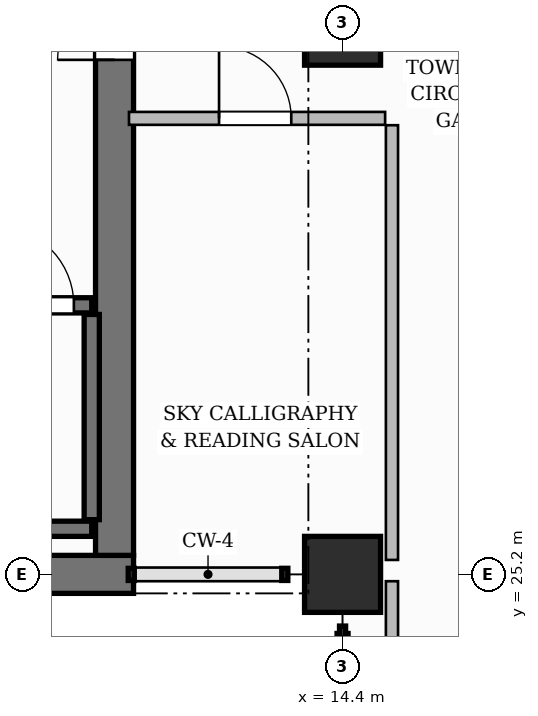
"""IFC4 building model, lengths in metres.
Left out: names, types, materials, properties, quantities, classifications, styles, units other than length and angle.
Written with IfcOpenShell. Run it as: python <this file> out.ifc"""

import sys

from ifc_helpers import new_model, si_unit, direction, frame, frame_2d, origin, origin_2d, place, context, subcontext, project, spatial, rectangle, extrude, source, transform, mapped, element, fill, save


model = new_model("IFC4")
c1 = context("Model", 3, precision=1e-05, world=origin(), true_north=direction((0.0, 1.0)))
c2 = subcontext(c1, "Body", "Model", "MODEL_VIEW")
j1 = project(units=[si_unit("LENGTHUNIT", "METRE"), si_unit("PLANEANGLEUNIT", "RADIAN")], contexts=[c1])
p1 = place(None, origin())
s1 = spatial("IfcSite", under=j1, at=p1, CompositionType="ELEMENT")
p2 = place(p1, origin())
s2 = spatial("IfcBuilding", under=s1, at=p2, CompositionType="ELEMENT")
p3 = place(p2, frame((0.0, 0.0, 192.65)))
s3 = spatial("IfcBuildingStorey", under=s2, at=p3, CompositionType="ELEMENT", Elevation=192.65)
p4 = place(p3, frame((3.35, 25.2, 0.0), z_axis=(0.0, 0.0, 1.0), x_axis=(1.0, 0.0, 0.0)))
e1 = element("IfcWall", 1, at=p4, inside=s3, PredefinedType="SHEAR", context=c2, shape_type="SweptSolid", body=[
    extrude(rectangle(XDim=8.3, YDim=0.5, at=frame_2d((4.15, 0.0))), origin(), (0.0, 0.0, 1.0), 3.85),
])
p5 = place(p3, frame((11.4, 25.45, 0.0), z_axis=(0.0, 0.0, 1.0), x_axis=(0.0, 1.0, 0.0)))
e2 = element("IfcWall", 2, at=p5, inside=s3, PredefinedType="SHEAR", context=c2, shape_type="SweptSolid", body=[
    extrude(rectangle(XDim=13.9, YDim=0.5, at=frame_2d((6.95, 0.0))), origin(), (0.0, 0.0, 1.0), 3.85),
])
p6 = place(p5, frame((6.52, 0.0, 0.0)))
e3 = element("IfcOpeningElement", 3, at=p6, cuts=e2, PredefinedType="OPENING", context=c2, shape_type="SweptSolid", body=[
    extrude(rectangle(XDim=1.5, YDim=2.2, at=frame_2d((0.75, 1.1))), frame((0.0, 0.26, 0.0), z_axis=(0.0, -1.0, 0.0), x_axis=(1.0, 0.0, 0.0)), (0.0, 0.0, 1.0), 0.52),
])
m1 = source(origin(), c2, "Body", "SweptSolid", [
    extrude(rectangle(XDim=1.0, YDim=1.0, at=origin_2d()), origin(), (0.0, 0.0, 1.0), 3.85),
])
for number, where, z_axis, x_axis in (
    (4, (14.4, 25.2, 0.0), (0.0, 0.0, 1.0), (1.0, 0.0, 0.0)),
    (5, (14.4, 32.4, 0.0), (0.0, 0.0, 1.0), (1.0, 0.0, 0.0)),
):
    element("IfcColumn", number, at=place(p3, frame(where, z_axis=z_axis, x_axis=x_axis)), inside=s3, PredefinedType="COLUMN", context=c2, shape_type="MappedRepresentation", body=[
        mapped(m1, transform((0.0, 0.0, 0.0), scale=1.0)),
    ])
p7 = place(p3, frame((4.0, 25.8, 0.0), z_axis=(0.0, 0.0, 1.0), x_axis=(1.0, 0.0, 0.0)))
e6 = element("IfcWall", 6, at=p7, inside=s3, PredefinedType="SHEAR", context=c2, shape_type="SweptSolid", body=[
    extrude(rectangle(XDim=7.1, YDim=0.2, at=frame_2d((3.55, 0.0))), origin(), (0.0, 0.0, 1.0), 3.85),
])
p8 = place(p3, frame((11.1, 25.92, 0.0), z_axis=(0.0, 0.0, 1.0), x_axis=(0.0, 1.0, 0.0)))
e7 = element("IfcWall", 7, at=p8, inside=s3, PredefinedType="SHEAR", context=c2, shape_type="SweptSolid", body=[
    extrude(rectangle(XDim=2.7, YDim=0.2, at=frame_2d((1.35, 0.0))), origin(), (0.0, 0.0, 1.0), 3.85),
])
p9 = place(p3, frame((4.0, 28.74, 0.0), z_axis=(0.0, 0.0, 1.0), x_axis=(1.0, 0.0, 0.0)))
e8 = element("IfcWall", 8, at=p9, inside=s3, PredefinedType="SHEAR", context=c2, shape_type="SweptSolid", body=[
    extrude(rectangle(XDim=7.1, YDim=0.2, at=frame_2d((3.55, 0.0))), origin(), (0.0, 0.0, 1.0), 3.85),
])
p10 = place(p9, frame((5.815, 0.0, 0.0)))
e9 = element("IfcOpeningElement", 9, at=p10, cuts=e8, PredefinedType="OPENING", context=c2, shape_type="SweptSolid", body=[
    extrude(rectangle(XDim=1.05, YDim=2.2, at=frame_2d((0.525, 1.1))), frame((0.0, 0.11, 0.0), z_axis=(0.0, -1.0, 0.0), x_axis=(1.0, 0.0, 0.0)), (0.0, 0.0, 1.0), 0.22),
])
p11 = place(p3, frame((15.05, 12.16, 0.0), z_axis=(0.0, 0.0, 1.0), x_axis=(0.0, 1.0, 0.0)))
e10 = element("IfcWall", 10, at=p11, inside=s3, PredefinedType="PARTITIONING", context=c2, shape_type="SweptSolid", body=[
    extrude(rectangle(XDim=12.95, YDim=0.16, at=frame_2d((6.475, 0.0))), origin(), (0.0, 0.0, 1.0), 3.55),
])
p12 = place(p3, frame((15.05, 25.39, 0.0), z_axis=(0.0, 0.0, 1.0), x_axis=(0.0, 1.0, 0.0)))
e11 = element("IfcWall", 11, at=p12, inside=s3, PredefinedType="PARTITIONING", context=c2, shape_type="SweptSolid", body=[
    extrude(rectangle(XDim=5.72, YDim=0.16, at=frame_2d((2.86, 0.0))), origin(), (0.0, 0.0, 1.0), 3.55),
])
p13 = place(p3, frame((11.59, 31.2, 0.0), z_axis=(0.0, 0.0, 1.0), x_axis=(1.0, 0.0, 0.0)))
e12 = element("IfcWall", 12, at=p13, inside=s3, PredefinedType="PARTITIONING", context=c2, shape_type="SweptSolid", body=[
    extrude(rectangle(XDim=3.37, YDim=0.17, at=frame_2d((1.685, 0.0))), origin(), (0.0, 0.0, 1.0), 3.55),
])
p14 = place(p13, frame((1.185, 0.0, 0.0)))
e13 = element("IfcOpeningElement", 13, at=p14, cuts=e12, PredefinedType="OPENING", context=c2, shape_type="SweptSolid", body=[
    extrude(rectangle(XDim=0.95, YDim=2.15, at=frame_2d((0.475, 1.075))), frame((0.0, 0.095, 0.0), z_axis=(0.0, -1.0, 0.0), x_axis=(1.0, 0.0, 0.0)), (0.0, 0.0, 1.0), 0.19),
])
m2 = source(origin(), c2, "Body", "SweptSolid", [
    extrude(rectangle(XDim=1.05, YDim=2.2, at=frame_2d((0.525, 1.1))), frame((0.0, 0.025, 0.0), z_axis=(0.0, -1.0, 0.0), x_axis=(1.0, 0.0, 0.0)), (0.0, 0.0, 1.0), 0.05),
])
p15 = place(p10, origin())
e14 = element("IfcDoor", 14, at=p15, inside=s3, OperationType="SINGLE_SWING_LEFT", PredefinedType="DOOR", context=c2, shape_type="MappedRepresentation", body=[
    mapped(m2, transform((0.0, 0.0, 0.0), scale=1.0)),
])
fill(e9, e14)
m3 = source(origin(), c2, "Body", "SweptSolid", [
    extrude(rectangle(XDim=1.5, YDim=2.2, at=frame_2d((0.75, 1.1))), frame((0.0, 0.025, 0.0), z_axis=(0.0, -1.0, 0.0), x_axis=(1.0, 0.0, 0.0)), (0.0, 0.0, 1.0), 0.05),
])
p16 = place(p6, origin())
e15 = element("IfcDoor", 15, at=p16, inside=s3, OperationType="DOUBLE_DOOR_SINGLE_SWING", PredefinedType="DOOR", context=c2, shape_type="MappedRepresentation", body=[
    mapped(m3, transform((0.0, 0.0, 0.0), scale=1.0)),
])
fill(e3, e15)
m4 = source(origin(), c2, "Body", "SweptSolid", [
    extrude(rectangle(XDim=0.95, YDim=2.15, at=frame_2d((0.475, 1.075))), frame((0.0, 0.025, 0.0), z_axis=(0.0, -1.0, 0.0), x_axis=(1.0, 0.0, 0.0)), (0.0, 0.0, 1.0), 0.05),
])
p17 = place(p14, origin())
e16 = element("IfcDoor", 16, at=p17, inside=s3, OperationType="SINGLE_SWING_LEFT", PredefinedType="DOOR", context=c2, shape_type="MappedRepresentation", body=[
    mapped(m4, transform((0.0, 0.0, 0.0), scale=1.0)),
])
fill(e13, e16)
save(model, sys.argv[1])
